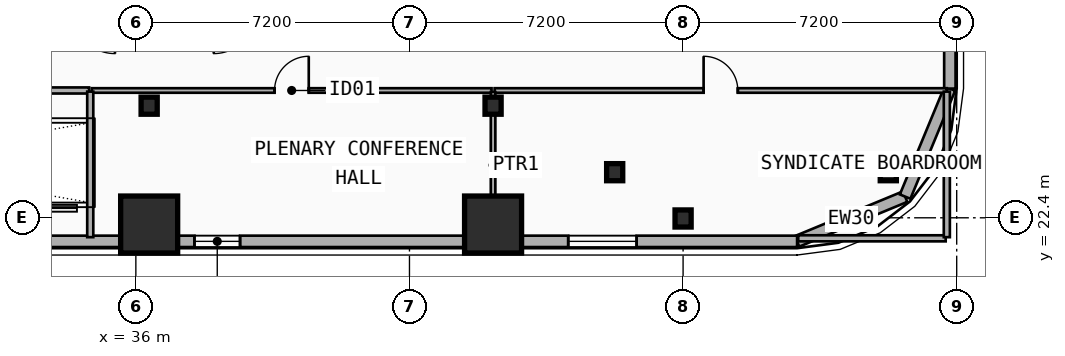
"""IFC4 building model, lengths in metres.
Left out: names, types, materials, properties, quantities, classifications, styles, units other than length and angle.
Written with IfcOpenShell. Run it as: python <this file> out.ifc"""

import sys

from ifc_helpers import new_model, si_unit, direction, frame, frame_2d, origin, origin_2d, place, context, subcontext, project, spatial, rectangle, i_section, extrude, element, fill, save


model = new_model("IFC4")
c1 = context("Model", 3, precision=1e-05, world=origin(), true_north=direction((0.0, 1.0)))
c2 = subcontext(c1, "Body", "Model", "MODEL_VIEW")
j1 = project(units=[si_unit("LENGTHUNIT", "METRE"), si_unit("PLANEANGLEUNIT", "RADIAN")], contexts=[c1])
p1 = place(None, origin())
s1 = spatial("IfcSite", under=j1, at=p1, CompositionType="ELEMENT")
p2 = place(p1, origin())
s2 = spatial("IfcBuilding", under=s1, at=p2, CompositionType="ELEMENT")
p3 = place(p2, frame((0.0, 0.0, 43.0)))
s3 = spatial("IfcBuildingStorey", under=s2, at=p3, CompositionType="ELEMENT", Elevation=43.0)
for number, where, z_axis, x_axis in (
    (1, (36.35, 25.35, 0.0), (0.0, 0.0, 1.0), (1.0, 0.0, 0.0)),
    (2, (45.4, 25.35, 0.0), (0.0, 0.0, 1.0), (1.0, 0.0, 0.0)),
):
    element("IfcColumn", number, at=place(p3, frame(where, z_axis=z_axis, x_axis=x_axis)), inside=s3, PredefinedType="COLUMN", context=c2, shape_type="SweptSolid", body=[
        extrude(i_section(OverallWidth=0.424, OverallDepth=0.45, WebThickness=0.041, FlangeThickness=0.065, FilletRadius=0.015, at=origin_2d()), origin(), (0.0, 0.0, 1.0), 3.5),
    ])
for number, where, z_axis, x_axis in (
    (3, (36.35, 22.331, 0.0), (0.0, -0.09, 0.996), (1.0, 0.0, 0.0)),
    (4, (45.4, 22.331, 0.0), (0.0, -0.09, 0.996), (1.0, 0.0, 0.0)),
):
    element("IfcColumn", number, at=place(p3, frame(where, z_axis=z_axis, x_axis=x_axis)), inside=s3, PredefinedType="COLUMN", context=c2, shape_type="SweptSolid", body=[
        extrude(rectangle(XDim=1.5, YDim=1.5, at=origin_2d()), origin(), (0.0, 0.0, 1.0), 3.514),
    ])
p4 = place(p3, frame((48.6, 23.6, 0.0), z_axis=(0.0, 0.0, 1.0), x_axis=(1.0, 0.0, 0.0)))
e5 = element("IfcColumn", 5, at=p4, inside=s3, PredefinedType="COLUMN", context=c2, shape_type="SweptSolid", body=[
    extrude(i_section(OverallWidth=0.424, OverallDepth=0.45, WebThickness=0.041, FlangeThickness=0.065, FilletRadius=0.015, at=origin_2d()), origin(), (0.0, 0.0, 1.0), 3.5),
])
p5 = place(p3, frame((50.4, 22.478, 0.0), z_axis=(0.0, -0.079822602517, 0.996809085095), x_axis=(1.0, 0.0, 0.0)))
e6 = element("IfcColumn", 6, at=p5, inside=s3, PredefinedType="COLUMN", context=c2, shape_type="SweptSolid", body=[
    extrude(i_section(OverallWidth=0.424, OverallDepth=0.45, WebThickness=0.041, FlangeThickness=0.065, FilletRadius=0.015, at=origin_2d()), origin(), (0.0, 0.0, 1.0), 3.511),
])
p6 = place(p3, frame((55.8, 23.6, 0.0), z_axis=(0.0, 0.0, 1.0), x_axis=(1.0, 0.0, 0.0)))
e7 = element("IfcColumn", 7, at=p6, inside=s3, PredefinedType="COLUMN", context=c2, shape_type="SweptSolid", body=[
    extrude(i_section(OverallWidth=0.424, OverallDepth=0.45, WebThickness=0.041, FlangeThickness=0.065, FilletRadius=0.015, at=origin_2d()), origin(), (0.0, 0.0, 1.0), 3.5),
])
p7 = place(p3, frame((56.243, 22.958, 0.0), z_axis=(0.0, 0.0, 1.0), x_axis=(-0.923882414032, -0.382676475685, 0.0)))
e8 = element("IfcWall", 8, at=p7, inside=s3, PredefinedType="SOLIDWALL", context=c2, shape_type="SweptSolid", body=[
    extrude(rectangle(XDim=3.077, YDim=0.3, at=frame_2d((1.539, 0.0))), origin(), (0.0, 0.0, 1.0), 3.24),
])
p8 = place(p3, frame((57.42, 25.8, 0.0), z_axis=(0.0, 0.0, 1.0), x_axis=(-0.382636798336, -0.92389884758, 0.0)))
e9 = element("IfcWall", 9, at=p8, inside=s3, PredefinedType="SOLIDWALL", context=c2, shape_type="SweptSolid", body=[
    extrude(rectangle(XDim=3.077, YDim=0.3, at=frame_2d((1.538, 0.0))), origin(), (0.0, 0.0, 1.0), 3.24),
])
p9 = place(p3, frame((57.42, 41.0, 0.0), z_axis=(0.0, 0.0, 1.0), x_axis=(0.0, -1.0, 0.0)))
e10 = element("IfcWall", 10, at=p9, inside=s3, PredefinedType="SOLIDWALL", context=c2, shape_type="SweptSolid", body=[
    extrude(rectangle(XDim=15.2, YDim=0.3, at=frame_2d((7.6, 0.0))), origin(), (0.0, 0.0, 1.0), 3.24),
])
p10 = place(p9, frame((10.882, 0.0, 0.48)))
e11 = element("IfcOpeningElement", 11, at=p10, cuts=e10, PredefinedType="OPENING", context=c2, shape_type="SweptSolid", body=[
    extrude(rectangle(XDim=1.4, YDim=1.8, at=frame_2d((0.7, 0.9))), frame((0.0, 0.16, 0.0), z_axis=(0.0, -1.0, 0.0), x_axis=(1.0, 0.0, 0.0)), (0.0, 0.0, 1.0), 0.32),
])
p11 = place(p9, frame((5.621, 0.0, 0.48)))
e12 = element("IfcOpeningElement", 12, at=p11, cuts=e10, PredefinedType="OPENING", context=c2, shape_type="SweptSolid", body=[
    extrude(rectangle(XDim=1.4, YDim=1.8, at=frame_2d((0.7, 0.9))), frame((0.0, 0.16, 0.0), z_axis=(0.0, -1.0, 0.0), x_axis=(1.0, 0.0, 0.0)), (0.0, 0.0, 1.0), 0.32),
])
p12 = place(p3, frame((53.4, 21.78, 0.0), z_axis=(0.0, 0.0, 1.0), x_axis=(-1.0, 0.0, 0.0)))
e13 = element("IfcWall", 13, at=p12, inside=s3, PredefinedType="SOLIDWALL", context=c2, shape_type="SweptSolid", body=[
    extrude(rectangle(XDim=49.2, YDim=0.3, at=frame_2d((24.6, 0.0))), origin(), (0.0, 0.0, 1.0), 2.82),
])
p13 = place(p12, frame((46.859, 0.0, 0.65)))
e14 = element("IfcOpeningElement", 14, at=p13, cuts=e13, PredefinedType="OPENING", context=c2, shape_type="SweptSolid", body=[
    extrude(rectangle(XDim=1.8, YDim=1.8, at=frame_2d((0.9, 0.9))), frame((0.0, 0.16, 0.0), z_axis=(0.0, -1.0, 0.0), x_axis=(1.0, 0.0, 0.0)), (0.0, 0.0, 1.0), 0.32),
])
p14 = place(p12, frame((37.75, 0.0, 0.52)))
e15 = element("IfcOpeningElement", 15, at=p14, cuts=e13, PredefinedType="OPENING", context=c2, shape_type="SweptSolid", body=[
    extrude(rectangle(XDim=1.1, YDim=1.05, at=frame_2d((0.55, 0.525))), frame((0.0, 0.16, 0.0), z_axis=(0.0, -1.0, 0.0), x_axis=(1.0, 0.0, 0.0)), (0.0, 0.0, 1.0), 0.32),
])
p15 = place(p12, frame((14.658, 0.0, 0.34)))
e16 = element("IfcOpeningElement", 16, at=p15, cuts=e13, PredefinedType="OPENING", context=c2, shape_type="SweptSolid", body=[
    extrude(rectangle(XDim=1.2, YDim=1.5, at=frame_2d((0.6, 0.75))), frame((0.0, 0.16, 0.0), z_axis=(0.0, -1.0, 0.0), x_axis=(1.0, 0.0, 0.0)), (0.0, 0.0, 1.0), 0.32),
])
p16 = place(p12, frame((4.223, 0.0, 0.65)))
e17 = element("IfcOpeningElement", 17, at=p16, cuts=e13, PredefinedType="OPENING", context=c2, shape_type="SweptSolid", body=[
    extrude(rectangle(XDim=1.8, YDim=1.8, at=frame_2d((0.9, 0.9))), frame((0.0, 0.16, 0.0), z_axis=(0.0, -1.0, 0.0), x_axis=(1.0, 0.0, 0.0)), (0.0, 0.0, 1.0), 0.32),
])
p17 = place(p3, frame((34.84, 25.75, 0.0), z_axis=(0.0, 0.0, 1.0), x_axis=(1.0, 0.0, 0.0)))
e18 = element("IfcWall", 18, at=p17, inside=s3, PredefinedType="PARTITIONING", context=c2, shape_type="SweptSolid", body=[
    extrude(rectangle(XDim=10.52, YDim=0.12, at=frame_2d((5.26, 0.0))), origin(), (0.0, 0.0, 1.0), 2.28),
])
p18 = place(p17, frame((4.81, 0.0, 0.0)))
e19 = element("IfcOpeningElement", 19, at=p18, cuts=e18, PredefinedType="OPENING", context=c2, shape_type="SweptSolid", body=[
    extrude(rectangle(XDim=0.9, YDim=2.1, at=frame_2d((0.45, 1.05))), frame((0.0, 0.07, 0.0), z_axis=(0.0, -1.0, 0.0), x_axis=(1.0, 0.0, 0.0)), (0.0, 0.0, 1.0), 0.14),
])
p19 = place(p3, frame((45.44, 25.75, 0.0), z_axis=(0.0, 0.0, 1.0), x_axis=(1.0, 0.0, 0.0)))
e20 = element("IfcWall", 20, at=p19, inside=s3, PredefinedType="PARTITIONING", context=c2, shape_type="SweptSolid", body=[
    extrude(rectangle(XDim=11.9, YDim=0.12, at=frame_2d((5.95, 0.0))), origin(), (0.0, 0.0, 1.0), 2.28),
])
p20 = place(p19, frame((5.5, 0.0, 0.0)))
e21 = element("IfcOpeningElement", 21, at=p20, cuts=e20, PredefinedType="OPENING", context=c2, shape_type="SweptSolid", body=[
    extrude(rectangle(XDim=0.9, YDim=2.1, at=frame_2d((0.45, 1.05))), frame((0.0, 0.07, 0.0), z_axis=(0.0, -1.0, 0.0), x_axis=(1.0, 0.0, 0.0)), (0.0, 0.0, 1.0), 0.14),
])
p21 = place(p3, frame((45.4, 21.86, 0.0), z_axis=(0.0, 0.0, 1.0), x_axis=(0.0, 1.0, 0.0)))
e22 = element("IfcWall", 22, at=p21, inside=s3, PredefinedType="PARTITIONING", context=c2, shape_type="SweptSolid", body=[
    extrude(rectangle(XDim=3.85, YDim=0.12, at=frame_2d((1.925, 0.0))), origin(), (0.0, 0.0, 1.0), 2.28),
])
p22 = place(p3, frame((22.83, 25.75, 0.0), z_axis=(0.0, 0.0, 1.0), x_axis=(1.0, 0.0, 0.0)))
e23 = element("IfcWall", 23, at=p22, inside=s3, PredefinedType="PARTITIONING", context=c2, shape_type="SweptSolid", body=[
    extrude(rectangle(XDim=11.94, YDim=0.16, at=frame_2d((5.97, 0.0))), origin(), (0.0, 0.0, 1.0), 3.24),
])
p23 = place(p3, frame((34.8, 21.89, 0.0), z_axis=(0.0, 0.0, 1.0), x_axis=(0.0, 1.0, 0.0)))
e24 = element("IfcWall", 24, at=p23, inside=s3, PredefinedType="PARTITIONING", context=c2, shape_type="SweptSolid", body=[
    extrude(rectangle(XDim=3.83, YDim=0.16, at=frame_2d((1.915, 0.0))), origin(), (0.0, 0.0, 1.0), 2.82),
])
p24 = place(p3, frame((53.43, 21.86, 0.0), z_axis=(0.0, 0.0, 1.0), x_axis=(1.0, 0.0, 0.0)))
e25 = element("IfcWall", 25, at=p24, inside=s3, PredefinedType="PARTITIONING", context=c2, shape_type="SweptSolid", body=[
    extrude(rectangle(XDim=3.88, YDim=0.16, at=frame_2d((1.94, 0.0))), origin(), (0.0, 0.0, 1.0), 2.72),
])
p25 = place(p3, frame((57.34, 21.89, 0.0), z_axis=(0.0, 0.0, 1.0), x_axis=(0.0, 1.0, 0.0)))
e26 = element("IfcWall", 26, at=p25, inside=s3, PredefinedType="PARTITIONING", context=c2, shape_type="SweptSolid", body=[
    extrude(rectangle(XDim=3.83, YDim=0.16, at=frame_2d((1.915, 0.0))), origin(), (0.0, 0.0, 1.0), 3.24),
])
p26 = place(p15, origin())
e27 = element("IfcWindow", 27, at=p26, inside=s3, PartitioningType="SINGLE_PANEL", PredefinedType="WINDOW", context=c2, shape_type="SweptSolid", body=[
    extrude(rectangle(XDim=1.2, YDim=1.5, at=frame_2d((0.6, 0.75))), frame((0.0, 0.03, 0.0), z_axis=(0.0, -1.0, 0.0), x_axis=(1.0, 0.0, 0.0)), (0.0, 0.0, 1.0), 0.06),
])
fill(e16, e27)
p27 = place(p16, origin())
e28 = element("IfcWindow", 28, at=p27, inside=s3, PartitioningType="SINGLE_PANEL", PredefinedType="WINDOW", context=c2, shape_type="SweptSolid", body=[
    extrude(rectangle(XDim=1.8, YDim=1.8, at=frame_2d((0.9, 0.9))), frame((0.0, 0.03, 0.0), z_axis=(0.0, -1.0, 0.0), x_axis=(1.0, 0.0, 0.0)), (0.0, 0.0, 1.0), 0.06),
])
fill(e17, e28)
p28 = place(p18, origin())
e29 = element("IfcDoor", 29, at=p28, inside=s3, OperationType="SINGLE_SWING_RIGHT", PredefinedType="DOOR", context=c2, shape_type="SweptSolid", body=[
    extrude(rectangle(XDim=0.9, YDim=2.1, at=frame_2d((0.45, 1.05))), frame((0.0, 0.025, 0.0), z_axis=(0.0, -1.0, 0.0), x_axis=(1.0, 0.0, 0.0)), (0.0, 0.0, 1.0), 0.05),
])
fill(e19, e29)
p29 = place(p20, origin())
e30 = element("IfcDoor", 30, at=p29, inside=s3, OperationType="SINGLE_SWING_LEFT", PredefinedType="DOOR", context=c2, shape_type="SweptSolid", body=[
    extrude(rectangle(XDim=0.9, YDim=2.1, at=frame_2d((0.45, 1.05))), frame((0.0, 0.025, 0.0), z_axis=(0.0, -1.0, 0.0), x_axis=(1.0, 0.0, 0.0)), (0.0, 0.0, 1.0), 0.05),
])
fill(e21, e30)
save(model, sys.argv[1])
